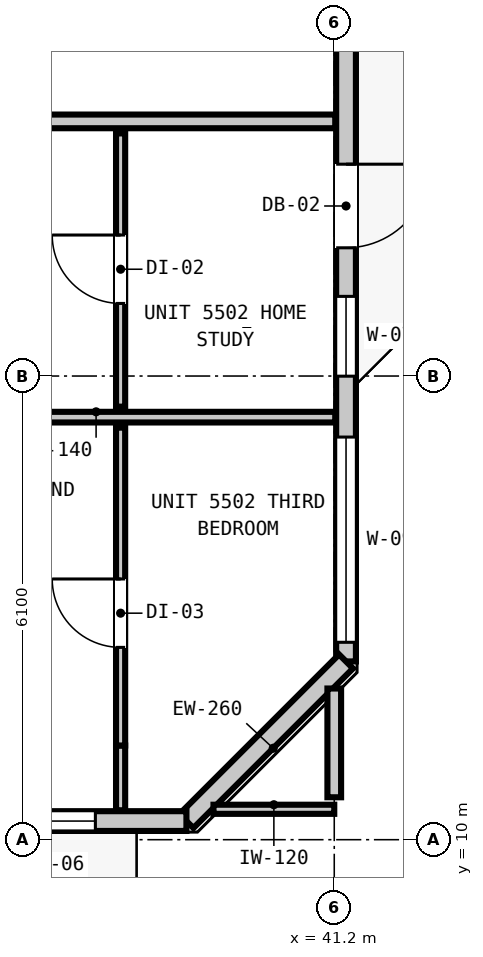
"""IFC4 building model, lengths in metres.
Left out: names, types, materials, properties, quantities, classifications, styles, units other than length and angle.
Written with IfcOpenShell. Run it as: python <this file> out.ifc"""

import sys

from ifc_helpers import new_model, si_unit, direction, frame, frame_2d, origin, place, context, subcontext, project, spatial, rectangle, extrude, element, fill, save


model = new_model("IFC4")
c1 = context("Model", 3, precision=1e-05, world=origin(), true_north=direction((0.0, 1.0)))
c2 = subcontext(c1, "Body", "Model", "MODEL_VIEW")
j1 = project(units=[si_unit("LENGTHUNIT", "METRE"), si_unit("PLANEANGLEUNIT", "RADIAN")], contexts=[c1])
p1 = place(None, origin())
s1 = spatial("IfcSite", under=j1, at=p1, CompositionType="ELEMENT")
p2 = place(p1, origin())
s2 = spatial("IfcBuilding", under=s1, at=p2, CompositionType="ELEMENT")
p3 = place(p2, frame((0.0, 0.0, 190.16)))
s3 = spatial("IfcBuildingStorey", under=s2, at=p3, CompositionType="ELEMENT", Elevation=190.16)
p4 = place(p3, frame((41.355, 42.655, 0.0), z_axis=(0.0, 0.0, 1.0), x_axis=(0.0, -1.0, 0.0)))
e1 = element("IfcWall", 1, at=p4, inside=s3, PredefinedType="STANDARD", context=c2, shape_type="SweptSolid", body=[
    extrude(rectangle(XDim=30.31, YDim=0.26, at=frame_2d((15.155, 0.0))), origin(), (0.0, 0.0, 1.0), 3.1),
])
p5 = place(p4, frame((23.768, 0.0, 0.0)))
e2 = element("IfcOpeningElement", 2, at=p5, cuts=e1, PredefinedType="OPENING", context=c2, shape_type="SweptSolid", body=[
    extrude(rectangle(XDim=1.1, YDim=2.15, at=frame_2d((0.55, 1.075))), frame((0.0, 0.14, 0.0), z_axis=(0.0, -1.0, 0.0), x_axis=(1.0, 0.0, 0.0)), (0.0, 0.0, 1.0), 0.28),
])
p6 = place(p4, frame((25.507, 0.0, 0.85)))
e3 = element("IfcOpeningElement", 3, at=p6, cuts=e1, PredefinedType="OPENING", context=c2, shape_type="SweptSolid", body=[
    extrude(rectangle(XDim=1.05, YDim=1.65, at=frame_2d((0.525, 0.825))), frame((0.0, 0.14, 0.0), z_axis=(0.0, -1.0, 0.0), x_axis=(1.0, 0.0, 0.0)), (0.0, 0.0, 1.0), 0.28),
])
p7 = place(p4, frame((27.358, 0.0, 0.85)))
e4 = element("IfcOpeningElement", 4, at=p7, cuts=e1, PredefinedType="OPENING", context=c2, shape_type="SweptSolid", body=[
    extrude(rectangle(XDim=2.7, YDim=2.0, at=frame_2d((1.35, 1.0))), frame((0.0, 0.14, 0.0), z_axis=(0.0, -1.0, 0.0), x_axis=(1.0, 0.0, 0.0)), (0.0, 0.0, 1.0), 0.28),
])
p8 = place(p3, frame((41.355, 12.345, 0.0), z_axis=(0.0, 0.0, 1.0), x_axis=(-0.707147883682, -0.707065676302, 0.0)))
e5 = element("IfcWall", 5, at=p8, inside=s3, PredefinedType="STANDARD", context=c2, shape_type="SweptSolid", body=[
    extrude(rectangle(XDim=2.97, YDim=0.26, at=frame_2d((1.485, 0.0))), origin(), (0.0, 0.0, 1.0), 3.1),
])
p9 = place(p3, frame((39.255, 10.245, 0.0), z_axis=(0.0, 0.0, 1.0), x_axis=(-1.0, 0.0, 0.0)))
e6 = element("IfcWall", 6, at=p9, inside=s3, PredefinedType="STANDARD", context=c2, shape_type="SweptSolid", body=[
    extrude(rectangle(XDim=32.71, YDim=0.26, at=frame_2d((16.355, 0.0))), origin(), (0.0, 0.0, 1.0), 3.1),
])
p10 = place(p9, frame((4.776, 0.0, 0.0)))
e7 = element("IfcOpeningElement", 7, at=p10, cuts=e6, PredefinedType="OPENING", context=c2, shape_type="SweptSolid", body=[
    extrude(rectangle(XDim=1.0, YDim=2.15, at=frame_2d((0.5, 1.075))), frame((0.0, 0.14, 0.0), z_axis=(0.0, -1.0, 0.0), x_axis=(1.0, 0.0, 0.0)), (0.0, 0.0, 1.0), 0.28),
])
p11 = place(p9, frame((21.443, 0.0, 0.85)))
e8 = element("IfcOpeningElement", 8, at=p11, cuts=e6, PredefinedType="OPENING", context=c2, shape_type="SweptSolid", body=[
    extrude(rectangle(XDim=2.7, YDim=2.0, at=frame_2d((1.35, 1.0))), frame((0.0, 0.14, 0.0), z_axis=(0.0, -1.0, 0.0), x_axis=(1.0, 0.0, 0.0)), (0.0, 0.0, 1.0), 0.28),
])
p12 = place(p9, frame((29.443, 0.0, 0.85)))
e9 = element("IfcOpeningElement", 9, at=p12, cuts=e6, PredefinedType="OPENING", context=c2, shape_type="SweptSolid", body=[
    extrude(rectangle(XDim=2.7, YDim=2.0, at=frame_2d((1.35, 1.0))), frame((0.0, 0.14, 0.0), z_axis=(0.0, -1.0, 0.0), x_axis=(1.0, 0.0, 0.0)), (0.0, 0.0, 1.0), 0.28),
])
p13 = place(p9, frame((14.653, 0.0, 0.85)))
e10 = element("IfcOpeningElement", 10, at=p13, cuts=e6, PredefinedType="OPENING", context=c2, shape_type="SweptSolid", body=[
    extrude(rectangle(XDim=2.7, YDim=2.0, at=frame_2d((1.35, 1.0))), frame((0.0, 0.14, 0.0), z_axis=(0.0, -1.0, 0.0), x_axis=(1.0, 0.0, 0.0)), (0.0, 0.0, 1.0), 0.28),
])
p14 = place(p9, frame((6.65, 0.0, 0.85)))
e11 = element("IfcOpeningElement", 11, at=p14, cuts=e6, PredefinedType="OPENING", context=c2, shape_type="SweptSolid", body=[
    extrude(rectangle(XDim=1.05, YDim=1.65, at=frame_2d((0.525, 0.825))), frame((0.0, 0.14, 0.0), z_axis=(0.0, -1.0, 0.0), x_axis=(1.0, 0.0, 0.0)), (0.0, 0.0, 1.0), 0.28),
])
p15 = place(p9, frame((10.779, 0.0, 0.85)))
e12 = element("IfcOpeningElement", 12, at=p15, cuts=e6, PredefinedType="OPENING", context=c2, shape_type="SweptSolid", body=[
    extrude(rectangle(XDim=2.7, YDim=2.0, at=frame_2d((1.35, 1.0))), frame((0.0, 0.14, 0.0), z_axis=(0.0, -1.0, 0.0), x_axis=(1.0, 0.0, 0.0)), (0.0, 0.0, 1.0), 0.28),
])
p16 = place(p9, frame((1.198, 0.0, 0.85)))
e13 = element("IfcOpeningElement", 13, at=p16, cuts=e6, PredefinedType="OPENING", context=c2, shape_type="SweptSolid", body=[
    extrude(rectangle(XDim=0.9, YDim=1.5, at=frame_2d((0.45, 0.75))), frame((0.0, 0.14, 0.0), z_axis=(0.0, -1.0, 0.0), x_axis=(1.0, 0.0, 0.0)), (0.0, 0.0, 1.0), 0.28),
])
p17 = place(p3, frame((4.587, 19.45, 0.0), z_axis=(0.0, 0.0, 1.0), x_axis=(1.0, 0.0, 0.0)))
e14 = element("IfcWall", 14, at=p17, inside=s3, PredefinedType="PARTITIONING", context=c2, shape_type="SweptSolid", body=[
    extrude(rectangle(XDim=36.626, YDim=0.18, at=frame_2d((18.313, 0.0))), origin(), (0.0, 0.0, 1.0), 3.1),
])
p18 = place(p17, frame((9.707, 0.0, 0.0)))
e15 = element("IfcOpeningElement", 15, at=p18, cuts=e14, PredefinedType="OPENING", context=c2, shape_type="SweptSolid", body=[
    extrude(rectangle(XDim=1.0, YDim=2.15, at=frame_2d((0.5, 1.075))), frame((0.0, 0.1, 0.0), z_axis=(0.0, -1.0, 0.0), x_axis=(1.0, 0.0, 0.0)), (0.0, 0.0, 1.0), 0.2),
])
p19 = place(p17, frame((27.763, 0.0, 0.0)))
e16 = element("IfcOpeningElement", 16, at=p19, cuts=e14, PredefinedType="OPENING", context=c2, shape_type="SweptSolid", body=[
    extrude(rectangle(XDim=1.0, YDim=2.15, at=frame_2d((0.5, 1.075))), frame((0.0, 0.1, 0.0), z_axis=(0.0, -1.0, 0.0), x_axis=(1.0, 0.0, 0.0)), (0.0, 0.0, 1.0), 0.2),
])
p20 = place(p3, frame((34.92, 15.559, 0.0), z_axis=(0.0, 0.0, 1.0), x_axis=(1.0, 0.0, 0.0)))
e17 = element("IfcWall", 17, at=p20, inside=s3, PredefinedType="PARTITIONING", context=c2, shape_type="SweptSolid", body=[
    extrude(rectangle(XDim=6.293, YDim=0.14, at=frame_2d((3.146, 0.0))), origin(), (0.0, 0.0, 1.0), 3.1),
])
p21 = place(p3, frame((39.611, 10.4, 0.0), z_axis=(0.0, 0.0, 1.0), x_axis=(1.0, 0.0, 0.0)))
e18 = element("IfcWall", 18, at=p21, inside=s3, PredefinedType="PARTITIONING", context=c2, shape_type="SweptSolid", body=[
    extrude(rectangle(XDim=1.589, YDim=0.12, at=frame_2d((0.794, 0.0))), origin(), (0.0, 0.0, 1.0), 3.1),
])
p22 = place(p3, frame((41.2, 10.558, 0.0), z_axis=(0.0, 0.0, 1.0), x_axis=(0.0, 1.0, 0.0)))
e19 = element("IfcWall", 19, at=p22, inside=s3, PredefinedType="PARTITIONING", context=c2, shape_type="SweptSolid", body=[
    extrude(rectangle(XDim=1.431, YDim=0.18, at=frame_2d((0.715, 0.0))), origin(), (0.0, 0.0, 1.0), 3.1),
])
p23 = place(p3, frame((38.389, 10.387, 0.0), z_axis=(0.0, 0.0, 1.0), x_axis=(0.0, 1.0, 0.0)))
e20 = element("IfcWall", 20, at=p23, inside=s3, PredefinedType="PARTITIONING", context=c2, shape_type="SweptSolid", body=[
    extrude(rectangle(XDim=0.852, YDim=0.12, at=frame_2d((0.426, 0.0))), origin(), (0.0, 0.0, 1.0), 3.1),
])
p24 = place(p3, frame((38.389, 11.239, 0.0), z_axis=(0.0, 0.0, 1.0), x_axis=(0.0, 1.0, 0.0)))
e21 = element("IfcWall", 21, at=p24, inside=s3, PredefinedType="PARTITIONING", context=c2, shape_type="SweptSolid", body=[
    extrude(rectangle(XDim=4.182, YDim=0.12, at=frame_2d((2.091, 0.0))), origin(), (0.0, 0.0, 1.0), 2.477),
])
p25 = place(p24, frame((1.291, 0.0, 0.0)))
e22 = element("IfcOpeningElement", 22, at=p25, cuts=e21, PredefinedType="OPENING", context=c2, shape_type="SweptSolid", body=[
    extrude(rectangle(XDim=0.9, YDim=2.1, at=frame_2d((0.45, 1.05))), frame((0.0, 0.07, 0.0), z_axis=(0.0, -1.0, 0.0), x_axis=(1.0, 0.0, 0.0)), (0.0, 0.0, 1.0), 0.14),
])
p26 = place(p3, frame((38.389, 15.697, 0.0), z_axis=(0.0, 0.0, 1.0), x_axis=(0.0, 1.0, 0.0)))
e23 = element("IfcWall", 23, at=p26, inside=s3, PredefinedType="PARTITIONING", context=c2, shape_type="SweptSolid", body=[
    extrude(rectangle(XDim=3.595, YDim=0.12, at=frame_2d((1.797, 0.0))), origin(), (0.0, 0.0, 1.0), 2.477),
])
p27 = place(p26, frame((1.358, 0.0, 0.0)))
e24 = element("IfcOpeningElement", 24, at=p27, cuts=e23, PredefinedType="OPENING", context=c2, shape_type="SweptSolid", body=[
    extrude(rectangle(XDim=0.9, YDim=2.1, at=frame_2d((0.45, 1.05))), frame((0.0, 0.07, 0.0), z_axis=(0.0, -1.0, 0.0), x_axis=(1.0, 0.0, 0.0)), (0.0, 0.0, 1.0), 0.14),
])
p28 = place(p5, origin())
e25 = element("IfcDoor", 25, at=p28, inside=s3, OperationType="SINGLE_SWING_LEFT", PredefinedType="DOOR", context=c2, shape_type="SweptSolid", body=[
    extrude(rectangle(XDim=1.1, YDim=2.15, at=frame_2d((0.55, 1.075))), frame((0.0, 0.025, 0.0), z_axis=(0.0, -1.0, 0.0), x_axis=(1.0, 0.0, 0.0)), (0.0, 0.0, 1.0), 0.05),
])
fill(e2, e25)
p29 = place(p6, origin())
e26 = element("IfcWindow", 26, at=p29, inside=s3, PartitioningType="SINGLE_PANEL", PredefinedType="WINDOW", context=c2, shape_type="SweptSolid", body=[
    extrude(rectangle(XDim=1.05, YDim=1.65, at=frame_2d((0.525, 0.825))), frame((0.0, 0.03, 0.0), z_axis=(0.0, -1.0, 0.0), x_axis=(1.0, 0.0, 0.0)), (0.0, 0.0, 1.0), 0.06),
])
fill(e3, e26)
p30 = place(p7, origin())
e27 = element("IfcWindow", 27, at=p30, inside=s3, PartitioningType="SINGLE_PANEL", PredefinedType="WINDOW", context=c2, shape_type="SweptSolid", body=[
    extrude(rectangle(XDim=2.7, YDim=2.0, at=frame_2d((1.35, 1.0))), frame((0.0, 0.03, 0.0), z_axis=(0.0, -1.0, 0.0), x_axis=(1.0, 0.0, 0.0)), (0.0, 0.0, 1.0), 0.06),
])
fill(e4, e27)
p31 = place(p16, origin())
e28 = element("IfcWindow", 28, at=p31, inside=s3, PartitioningType="SINGLE_PANEL", PredefinedType="WINDOW", context=c2, shape_type="SweptSolid", body=[
    extrude(rectangle(XDim=0.9, YDim=1.5, at=frame_2d((0.45, 0.75))), frame((0.0, 0.03, 0.0), z_axis=(0.0, -1.0, 0.0), x_axis=(1.0, 0.0, 0.0)), (0.0, 0.0, 1.0), 0.06),
])
fill(e13, e28)
p32 = place(p27, origin())
e29 = element("IfcDoor", 29, at=p32, inside=s3, OperationType="SINGLE_SWING_RIGHT", PredefinedType="DOOR", context=c2, shape_type="SweptSolid", body=[
    extrude(rectangle(XDim=0.9, YDim=2.1, at=frame_2d((0.45, 1.05))), frame((0.0, 0.025, 0.0), z_axis=(0.0, -1.0, 0.0), x_axis=(1.0, 0.0, 0.0)), (0.0, 0.0, 1.0), 0.05),
])
fill(e24, e29)
p33 = place(p25, origin())
e30 = element("IfcDoor", 30, at=p33, inside=s3, OperationType="SINGLE_SWING_RIGHT", PredefinedType="DOOR", context=c2, shape_type="SweptSolid", body=[
    extrude(rectangle(XDim=0.9, YDim=2.1, at=frame_2d((0.45, 1.05))), frame((0.0, 0.025, 0.0), z_axis=(0.0, -1.0, 0.0), x_axis=(1.0, 0.0, 0.0)), (0.0, 0.0, 1.0), 0.05),
])
fill(e22, e30)
save(model, sys.argv[1])
